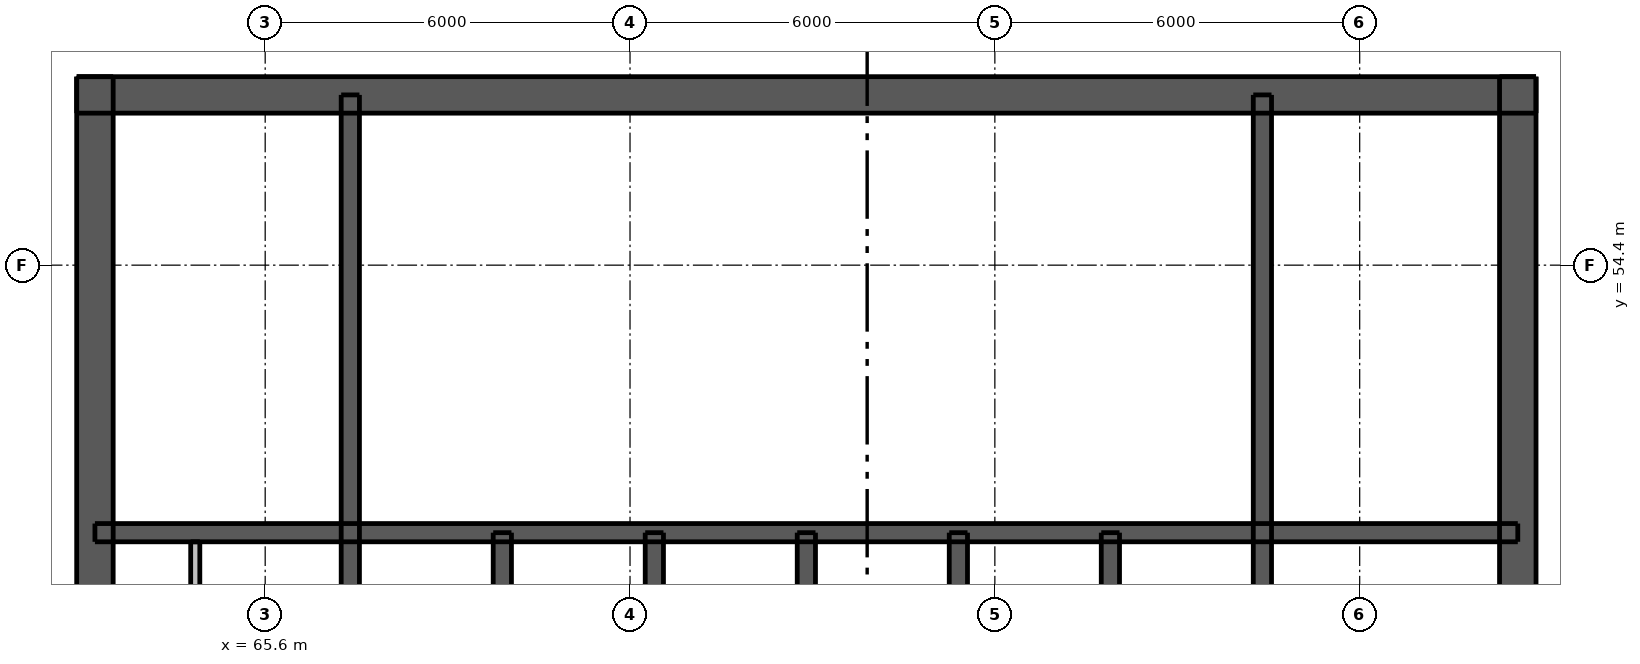
"""IFC4 building model, lengths in metres.
Left out: names, types, materials, properties, quantities, classifications, styles, units other than length and angle.
Written with IfcOpenShell. Run it as: python <this file> out.ifc"""

import sys

from ifc_helpers import new_model, si_unit, direction, frame, frame_2d, origin, place, context, subcontext, project, spatial, rectangle, extrude, element, fill, save


model = new_model("IFC4")
c1 = context("Model", 3, precision=1e-05, world=origin(), true_north=direction((0.0, 1.0)))
c2 = subcontext(c1, "Body", "Model", "MODEL_VIEW")
j1 = project(units=[si_unit("LENGTHUNIT", "METRE"), si_unit("PLANEANGLEUNIT", "RADIAN")], contexts=[c1])
p1 = place(None, origin())
s1 = spatial("IfcSite", under=j1, at=p1, CompositionType="ELEMENT")
p2 = place(p1, origin())
s2 = spatial("IfcBuilding", under=s1, at=p2, CompositionType="ELEMENT")
p3 = place(p2, frame((0.0, 0.0, 187.0)))
s3 = spatial("IfcBuildingStorey", under=s2, at=p3, CompositionType="ELEMENT", Elevation=187.0)
p4 = place(p3, frame((62.5, 57.2, 0.0), z_axis=(0.0, 0.0, 1.0), x_axis=(1.0, 0.0, 0.0)))
e1 = element("IfcWall", 1, at=p4, inside=s3, PredefinedType="SHEAR", context=c2, shape_type="SweptSolid", body=[
    extrude(rectangle(XDim=24.0, YDim=0.6, at=frame_2d((12.0, 0.0))), origin(), (0.0, 0.0, 1.0), 3.05),
])
p5 = place(p4, frame((20.975, 0.0, 0.0)))
e2 = element("IfcOpeningElement", 2, at=p5, cuts=e1, PredefinedType="OPENING", context=c2, shape_type="SweptSolid", body=[
    extrude(rectangle(XDim=1.1, YDim=2.1, at=frame_2d((0.55, 1.05))), frame((0.0, 0.31, 0.0), z_axis=(0.0, -1.0, 0.0), x_axis=(1.0, 0.0, 0.0)), (0.0, 0.0, 1.0), 0.62),
])
p6 = place(p4, frame((1.925, 0.0, 0.0)))
e3 = element("IfcOpeningElement", 3, at=p6, cuts=e1, PredefinedType="OPENING", context=c2, shape_type="SweptSolid", body=[
    extrude(rectangle(XDim=1.1, YDim=2.1, at=frame_2d((0.55, 1.05))), frame((0.0, 0.31, 0.0), z_axis=(0.0, -1.0, 0.0), x_axis=(1.0, 0.0, 0.0)), (0.0, 0.0, 1.0), 0.62),
])
p7 = place(p4, frame((11.55, 0.0, 0.0)))
e4 = element("IfcOpeningElement", 4, at=p7, cuts=e1, PredefinedType="OPENING", context=c2, shape_type="SweptSolid", body=[
    extrude(rectangle(XDim=0.9, YDim=2.1, at=frame_2d((0.45, 1.05))), frame((0.0, 0.31, 0.0), z_axis=(0.0, -1.0, 0.0), x_axis=(1.0, 0.0, 0.0)), (0.0, 0.0, 1.0), 0.62),
])
p8 = place(p3, frame((62.8, 33.5, 0.0), z_axis=(0.0, 0.0, 1.0), x_axis=(0.0, 1.0, 0.0)))
e5 = element("IfcWall", 5, at=p8, inside=s3, PredefinedType="SHEAR", context=c2, shape_type="SweptSolid", body=[
    extrude(rectangle(XDim=24.0, YDim=0.6, at=frame_2d((12.0, 0.0))), origin(), (0.0, 0.0, 1.0), 3.05),
])
p9 = place(p8, frame((11.2, 0.0, 0.0)))
e6 = element("IfcOpeningElement", 6, at=p9, cuts=e5, PredefinedType="OPENING", context=c2, shape_type="SweptSolid", body=[
    extrude(rectangle(XDim=1.6, YDim=2.1, at=frame_2d((0.8, 1.05))), frame((0.0, 0.31, 0.0), z_axis=(0.0, -1.0, 0.0), x_axis=(1.0, 0.0, 0.0)), (0.0, 0.0, 1.0), 0.62),
])
p10 = place(p3, frame((86.2, 33.5, 0.0), z_axis=(0.0, 0.0, 1.0), x_axis=(0.0, 1.0, 0.0)))
e7 = element("IfcWall", 7, at=p10, inside=s3, PredefinedType="SHEAR", context=c2, shape_type="SweptSolid", body=[
    extrude(rectangle(XDim=24.0, YDim=0.6, at=frame_2d((12.0, 0.0))), origin(), (0.0, 0.0, 1.0), 3.05),
])
p11 = place(p10, frame((11.2, 0.0, 0.0)))
e8 = element("IfcOpeningElement", 8, at=p11, cuts=e7, PredefinedType="OPENING", context=c2, shape_type="SweptSolid", body=[
    extrude(rectangle(XDim=1.6, YDim=2.1, at=frame_2d((0.8, 1.05))), frame((0.0, 0.31, 0.0), z_axis=(0.0, -1.0, 0.0), x_axis=(1.0, 0.0, 0.0)), (0.0, 0.0, 1.0), 0.62),
])
p12 = place(p3, frame((62.8, 50.0, 0.0), z_axis=(0.0, 0.0, 1.0), x_axis=(1.0, 0.0, 0.0)))
e9 = element("IfcWall", 9, at=p12, inside=s3, PredefinedType="SHEAR", context=c2, shape_type="SweptSolid", body=[
    extrude(rectangle(XDim=23.4, YDim=0.3, at=frame_2d((11.7, 0.0))), origin(), (0.0, 0.0, 1.0), 3.05),
])
for number, where, z_axis, x_axis in (
    (10, (67.0, 47.1, 0.0), (0.0, 0.0, 1.0), (0.0, 1.0, 0.0)),
    (11, (82.0, 47.1, 0.0), (0.0, 0.0, 1.0), (0.0, 1.0, 0.0)),
):
    element("IfcWall", number, at=place(p3, frame(where, z_axis=z_axis, x_axis=x_axis)), inside=s3, PredefinedType="SHEAR", context=c2, shape_type="SweptSolid", body=[
        extrude(rectangle(XDim=10.1, YDim=0.3, at=frame_2d((5.05, 0.0))), origin(), (0.0, 0.0, 1.0), 3.05),
    ])
for number, where, z_axis, x_axis in (
    (12, (69.5, 47.1, 0.0), (0.0, 0.0, 1.0), (0.0, 1.0, 0.0)),
    (13, (72.0, 47.1, 0.0), (0.0, 0.0, 1.0), (0.0, 1.0, 0.0)),
    (14, (74.5, 47.1, 0.0), (0.0, 0.0, 1.0), (0.0, 1.0, 0.0)),
    (15, (77.0, 47.1, 0.0), (0.0, 0.0, 1.0), (0.0, 1.0, 0.0)),
    (16, (79.5, 47.1, 0.0), (0.0, 0.0, 1.0), (0.0, 1.0, 0.0)),
):
    element("IfcWall", number, at=place(p3, frame(where, z_axis=z_axis, x_axis=x_axis)), inside=s3, PredefinedType="SHEAR", context=c2, shape_type="SweptSolid", body=[
        extrude(rectangle(XDim=2.9, YDim=0.3, at=frame_2d((1.45, 0.0))), origin(), (0.0, 0.0, 1.0), 3.05),
    ])
p13 = place(p3, frame((64.45, 47.25, 0.0), z_axis=(0.0, 0.0, 1.0), x_axis=(0.0, 1.0, 0.0)))
e17 = element("IfcWall", 17, at=p13, inside=s3, PredefinedType="PLUMBINGWALL", context=c2, shape_type="SweptSolid", body=[
    extrude(rectangle(XDim=2.6, YDim=0.15, at=frame_2d((1.3, 0.0))), origin(), (0.0, 0.0, 1.0), 3.05),
])
p14 = place(p5, origin())
e18 = element("IfcDoor", 18, at=p14, inside=s3, OperationType="SINGLE_SWING_RIGHT", PredefinedType="DOOR", context=c2, shape_type="SweptSolid", body=[
    extrude(rectangle(XDim=1.1, YDim=2.1, at=frame_2d((0.55, 1.05))), frame((0.0, -0.237, 0.0), z_axis=(0.0, -1.0, 0.0), x_axis=(1.0, 0.0, 0.0)), (0.0, 0.0, 1.0), 0.05),
])
fill(e2, e18)
p15 = place(p6, origin())
e19 = element("IfcDoor", 19, at=p15, inside=s3, OperationType="SINGLE_SWING_LEFT", PredefinedType="DOOR", context=c2, shape_type="SweptSolid", body=[
    extrude(rectangle(XDim=1.1, YDim=2.1, at=frame_2d((0.55, 1.05))), frame((0.0, -0.237, 0.0), z_axis=(0.0, -1.0, 0.0), x_axis=(1.0, 0.0, 0.0)), (0.0, 0.0, 1.0), 0.05),
])
fill(e3, e19)
p16 = place(p7, origin())
e20 = element("IfcDoor", 20, at=p16, inside=s3, OperationType="SINGLE_SWING_RIGHT", PredefinedType="DOOR", context=c2, shape_type="SweptSolid", body=[
    extrude(rectangle(XDim=0.9, YDim=2.1, at=frame_2d((0.45, 1.05))), frame((0.0, -0.237, 0.0), z_axis=(0.0, -1.0, 0.0), x_axis=(1.0, 0.0, 0.0)), (0.0, 0.0, 1.0), 0.05),
])
fill(e4, e20)
save(model, sys.argv[1])
